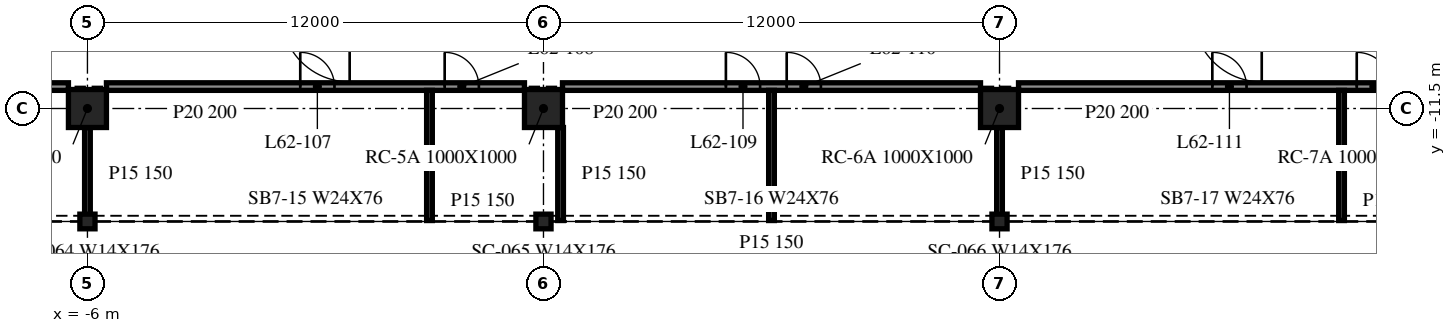
"""IFC4 building model, lengths in metres.
Left out: names, types, materials, properties, quantities, classifications, styles, units other than length and angle.
Written with IfcOpenShell. Run it as: python <this file> out.ifc"""

import sys

from ifc_helpers import new_model, si_unit, direction, frame, frame_2d, origin, origin_2d, place, context, subcontext, project, spatial, rectangle, i_section, extrude, element, fill, save


model = new_model("IFC4")
c1 = context("Model", 3, precision=1e-05, world=origin(), true_north=direction((0.0, 1.0)))
c2 = subcontext(c1, "Body", "Model", "MODEL_VIEW")
j1 = project(units=[si_unit("LENGTHUNIT", "METRE"), si_unit("PLANEANGLEUNIT", "RADIAN")], contexts=[c1])
p1 = place(None, origin())
s1 = spatial("IfcSite", under=j1, at=p1, CompositionType="ELEMENT")
p2 = place(p1, origin())
s2 = spatial("IfcBuilding", under=s1, at=p2, CompositionType="ELEMENT")
p3 = place(p2, frame((0.0, 0.0, 255.2)))
s3 = spatial("IfcBuildingStorey", under=s2, at=p3, CompositionType="ELEMENT", Elevation=255.2)
for number, where, z_axis, x_axis in (
    (1, (-6.0, -11.5, -0.34), (0.0, 0.0, 1.0), (1.0, 0.0, 0.0)),
    (2, (6.0, -11.5, -0.34), (0.0, 0.0, 1.0), (1.0, 0.0, 0.0)),
    (3, (18.0, -11.5, -0.34), (0.0, 0.0, 1.0), (1.0, 0.0, 0.0)),
):
    element("IfcColumn", number, at=place(p3, frame(where, z_axis=z_axis, x_axis=x_axis)), inside=s3, PredefinedType="COLUMN", context=c2, shape_type="SweptSolid", body=[
        extrude(rectangle(XDim=1.0, YDim=1.0, at=origin_2d()), origin(), (0.0, 0.0, 1.0), 3.74),
    ])
for number, where, z_axis, x_axis in (
    (4, (-6.0, -14.473, -0.34), (0.0, 0.0, 1.0), (1.0, 0.0, 0.0)),
    (5, (6.0, -14.473, -0.34), (0.0, 0.0, 1.0), (1.0, 0.0, 0.0)),
    (6, (18.0, -14.473, -0.34), (0.0, 0.0, 1.0), (1.0, 0.0, 0.0)),
):
    element("IfcColumn", number, at=place(p3, frame(where, z_axis=z_axis, x_axis=x_axis)), inside=s3, PredefinedType="COLUMN", context=c2, shape_type="SweptSolid", body=[
        extrude(i_section(OverallWidth=0.399, OverallDepth=0.386, WebThickness=0.021, FlangeThickness=0.033, at=origin_2d()), origin(), (0.0, 0.0, 1.0), 3.74),
    ])
p4 = place(p3, frame((-17.5, -10.923, 0.0), z_axis=(0.0, 0.0, 1.0), x_axis=(1.0, 0.0, 0.0)))
e7 = element("IfcWall", 7, at=p4, inside=s3, PredefinedType="PARTITIONING", context=c2, shape_type="SweptSolid", body=[
    extrude(rectangle(XDim=11.0, YDim=0.2, at=frame_2d((5.5, 0.0))), origin(), (0.0, 0.0, 1.0), 3.4),
])
p5 = place(p4, frame((4.7, 0.0, 0.0)))
e8 = element("IfcOpeningElement", 8, at=p5, cuts=e7, PredefinedType="OPENING", context=c2, shape_type="SweptSolid", body=[
    extrude(rectangle(XDim=0.9, YDim=2.1, at=frame_2d((0.45, 1.05))), frame((0.0, 0.11, 0.0), z_axis=(0.0, -1.0, 0.0), x_axis=(1.0, 0.0, 0.0)), (0.0, 0.0, 1.0), 0.22),
])
p6 = place(p4, frame((6.3, 0.0, 0.0)))
e9 = element("IfcOpeningElement", 9, at=p6, cuts=e7, PredefinedType="OPENING", context=c2, shape_type="SweptSolid", body=[
    extrude(rectangle(XDim=0.9, YDim=2.1, at=frame_2d((0.45, 1.05))), frame((0.0, 0.11, 0.0), z_axis=(0.0, -1.0, 0.0), x_axis=(1.0, 0.0, 0.0)), (0.0, 0.0, 1.0), 0.22),
])
p7 = place(p3, frame((-5.5, -10.923, 0.0), z_axis=(0.0, 0.0, 1.0), x_axis=(1.0, 0.0, 0.0)))
e10 = element("IfcWall", 10, at=p7, inside=s3, PredefinedType="PARTITIONING", context=c2, shape_type="SweptSolid", body=[
    extrude(rectangle(XDim=11.0, YDim=0.2, at=frame_2d((5.5, 0.0))), origin(), (0.0, 0.0, 1.0), 3.4),
])
p8 = place(p7, frame((5.1, 0.0, 0.0)))
e11 = element("IfcOpeningElement", 11, at=p8, cuts=e10, PredefinedType="OPENING", context=c2, shape_type="SweptSolid", body=[
    extrude(rectangle(XDim=0.9, YDim=2.1, at=frame_2d((0.45, 1.05))), frame((0.0, 0.11, 0.0), z_axis=(0.0, -1.0, 0.0), x_axis=(1.0, 0.0, 0.0)), (0.0, 0.0, 1.0), 0.22),
])
p9 = place(p7, frame((8.9, 0.0, 0.0)))
e12 = element("IfcOpeningElement", 12, at=p9, cuts=e10, PredefinedType="OPENING", context=c2, shape_type="SweptSolid", body=[
    extrude(rectangle(XDim=0.9, YDim=2.1, at=frame_2d((0.45, 1.05))), frame((0.0, 0.11, 0.0), z_axis=(0.0, -1.0, 0.0), x_axis=(1.0, 0.0, 0.0)), (0.0, 0.0, 1.0), 0.22),
])
p10 = place(p3, frame((6.5, -10.923, 0.0), z_axis=(0.0, 0.0, 1.0), x_axis=(1.0, 0.0, 0.0)))
e13 = element("IfcWall", 13, at=p10, inside=s3, PredefinedType="PARTITIONING", context=c2, shape_type="SweptSolid", body=[
    extrude(rectangle(XDim=11.0, YDim=0.2, at=frame_2d((5.5, 0.0))), origin(), (0.0, 0.0, 1.0), 3.4),
])
p11 = place(p10, frame((4.3, 0.0, 0.0)))
e14 = element("IfcOpeningElement", 14, at=p11, cuts=e13, PredefinedType="OPENING", context=c2, shape_type="SweptSolid", body=[
    extrude(rectangle(XDim=0.9, YDim=2.1, at=frame_2d((0.45, 1.05))), frame((0.0, 0.11, 0.0), z_axis=(0.0, -1.0, 0.0), x_axis=(1.0, 0.0, 0.0)), (0.0, 0.0, 1.0), 0.22),
])
p12 = place(p10, frame((5.9, 0.0, 0.0)))
e15 = element("IfcOpeningElement", 15, at=p12, cuts=e13, PredefinedType="OPENING", context=c2, shape_type="SweptSolid", body=[
    extrude(rectangle(XDim=0.9, YDim=2.1, at=frame_2d((0.45, 1.05))), frame((0.0, 0.11, 0.0), z_axis=(0.0, -1.0, 0.0), x_axis=(1.0, 0.0, 0.0)), (0.0, 0.0, 1.0), 0.22),
])
p13 = place(p3, frame((18.5, -10.923, 0.0), z_axis=(0.0, 0.0, 1.0), x_axis=(1.0, 0.0, 0.0)))
e16 = element("IfcWall", 16, at=p13, inside=s3, PredefinedType="PARTITIONING", context=c2, shape_type="SweptSolid", body=[
    extrude(rectangle(XDim=11.0, YDim=0.2, at=frame_2d((5.5, 0.0))), origin(), (0.0, 0.0, 1.0), 3.4),
])
p14 = place(p13, frame((5.1, 0.0, 0.0)))
e17 = element("IfcOpeningElement", 17, at=p14, cuts=e16, PredefinedType="OPENING", context=c2, shape_type="SweptSolid", body=[
    extrude(rectangle(XDim=0.9, YDim=2.1, at=frame_2d((0.45, 1.05))), frame((0.0, 0.11, 0.0), z_axis=(0.0, -1.0, 0.0), x_axis=(1.0, 0.0, 0.0)), (0.0, 0.0, 1.0), 0.22),
])
p15 = place(p13, frame((8.9, 0.0, 0.0)))
e18 = element("IfcOpeningElement", 18, at=p15, cuts=e16, PredefinedType="OPENING", context=c2, shape_type="SweptSolid", body=[
    extrude(rectangle(XDim=0.9, YDim=2.1, at=frame_2d((0.45, 1.05))), frame((0.0, 0.11, 0.0), z_axis=(0.0, -1.0, 0.0), x_axis=(1.0, 0.0, 0.0)), (0.0, 0.0, 1.0), 0.22),
])
p16 = place(p3, frame((-6.0, -14.448, 0.0), z_axis=(0.0, 0.0, 1.0), x_axis=(0.0, 1.0, 0.0)))
e19 = element("IfcWall", 19, at=p16, inside=s3, PredefinedType="PARTITIONING", context=c2, shape_type="SweptSolid", body=[
    extrude(rectangle(XDim=2.448, YDim=0.15, at=frame_2d((1.224, 0.0))), origin(), (0.0, 0.0, 1.0), 2.401),
])
p17 = place(p3, frame((3.0, -14.448, 0.0), z_axis=(0.0, 0.0, 1.0), x_axis=(0.0, 1.0, 0.0)))
e20 = element("IfcWall", 20, at=p17, inside=s3, PredefinedType="PARTITIONING", context=c2, shape_type="SweptSolid", body=[
    extrude(rectangle(XDim=3.425, YDim=0.15, at=frame_2d((1.712, 0.0))), origin(), (0.0, 0.0, 1.0), 3.4),
])
p18 = place(p3, frame((6.45, -14.448, 0.0), z_axis=(0.0, 0.0, 1.0), x_axis=(0.0, 1.0, 0.0)))
e21 = element("IfcWall", 21, at=p18, inside=s3, PredefinedType="PARTITIONING", context=c2, shape_type="SweptSolid", body=[
    extrude(rectangle(XDim=2.448, YDim=0.15, at=frame_2d((1.224, 0.0))), origin(), (0.0, 0.0, 1.0), 3.4),
])
p19 = place(p3, frame((12.0, -14.448, 0.0), z_axis=(0.0, 0.0, 1.0), x_axis=(0.0, 1.0, 0.0)))
e22 = element("IfcWall", 22, at=p19, inside=s3, PredefinedType="PARTITIONING", context=c2, shape_type="SweptSolid", body=[
    extrude(rectangle(XDim=3.425, YDim=0.15, at=frame_2d((1.712, 0.0))), origin(), (0.0, 0.0, 1.0), 3.4),
])
p20 = place(p3, frame((18.0, -14.448, 0.0), z_axis=(0.0, 0.0, 1.0), x_axis=(0.0, 1.0, 0.0)))
e23 = element("IfcWall", 23, at=p20, inside=s3, PredefinedType="PARTITIONING", context=c2, shape_type="SweptSolid", body=[
    extrude(rectangle(XDim=2.448, YDim=0.15, at=frame_2d((1.224, 0.0))), origin(), (0.0, 0.0, 1.0), 2.401),
])
p21 = place(p3, frame((27.0, -14.448, 0.0), z_axis=(0.0, 0.0, 1.0), x_axis=(0.0, 1.0, 0.0)))
e24 = element("IfcWall", 24, at=p21, inside=s3, PredefinedType="PARTITIONING", context=c2, shape_type="SweptSolid", body=[
    extrude(rectangle(XDim=3.425, YDim=0.15, at=frame_2d((1.712, 0.0))), origin(), (0.0, 0.0, 1.0), 3.4),
])
p22 = place(p8, origin())
e25 = element("IfcDoor", 25, at=p22, inside=s3, OperationType="SINGLE_SWING_LEFT", PredefinedType="DOOR", context=c2, shape_type="SweptSolid", body=[
    extrude(rectangle(XDim=0.9, YDim=2.1, at=frame_2d((0.45, 1.05))), frame((0.0, 0.025, 0.0), z_axis=(0.0, -1.0, 0.0), x_axis=(1.0, 0.0, 0.0)), (0.0, 0.0, 1.0), 0.05),
])
fill(e11, e25)
p23 = place(p9, origin())
e26 = element("IfcDoor", 26, at=p23, inside=s3, OperationType="SINGLE_SWING_LEFT", PredefinedType="DOOR", context=c2, shape_type="SweptSolid", body=[
    extrude(rectangle(XDim=0.9, YDim=2.1, at=frame_2d((0.45, 1.05))), frame((0.0, 0.025, 0.0), z_axis=(0.0, -1.0, 0.0), x_axis=(1.0, 0.0, 0.0)), (0.0, 0.0, 1.0), 0.05),
])
fill(e12, e26)
p24 = place(p11, origin())
e27 = element("IfcDoor", 27, at=p24, inside=s3, OperationType="SINGLE_SWING_RIGHT", PredefinedType="DOOR", context=c2, shape_type="SweptSolid", body=[
    extrude(rectangle(XDim=0.9, YDim=2.1, at=frame_2d((0.45, 1.05))), frame((0.0, 0.025, 0.0), z_axis=(0.0, -1.0, 0.0), x_axis=(1.0, 0.0, 0.0)), (0.0, 0.0, 1.0), 0.05),
])
fill(e14, e27)
p25 = place(p12, origin())
e28 = element("IfcDoor", 28, at=p25, inside=s3, OperationType="SINGLE_SWING_LEFT", PredefinedType="DOOR", context=c2, shape_type="SweptSolid", body=[
    extrude(rectangle(XDim=0.9, YDim=2.1, at=frame_2d((0.45, 1.05))), frame((0.0, 0.025, 0.0), z_axis=(0.0, -1.0, 0.0), x_axis=(1.0, 0.0, 0.0)), (0.0, 0.0, 1.0), 0.05),
])
fill(e15, e28)
p26 = place(p14, origin())
e29 = element("IfcDoor", 29, at=p26, inside=s3, OperationType="SINGLE_SWING_LEFT", PredefinedType="DOOR", context=c2, shape_type="SweptSolid", body=[
    extrude(rectangle(XDim=0.9, YDim=2.1, at=frame_2d((0.45, 1.05))), frame((0.0, 0.025, 0.0), z_axis=(0.0, -1.0, 0.0), x_axis=(1.0, 0.0, 0.0)), (0.0, 0.0, 1.0), 0.05),
])
fill(e17, e29)
p27 = place(p15, origin())
e30 = element("IfcDoor", 30, at=p27, inside=s3, OperationType="SINGLE_SWING_LEFT", PredefinedType="DOOR", context=c2, shape_type="SweptSolid", body=[
    extrude(rectangle(XDim=0.9, YDim=2.1, at=frame_2d((0.45, 1.05))), frame((0.0, 0.025, 0.0), z_axis=(0.0, -1.0, 0.0), x_axis=(1.0, 0.0, 0.0)), (0.0, 0.0, 1.0), 0.05),
])
fill(e18, e30)
save(model, sys.argv[1])
